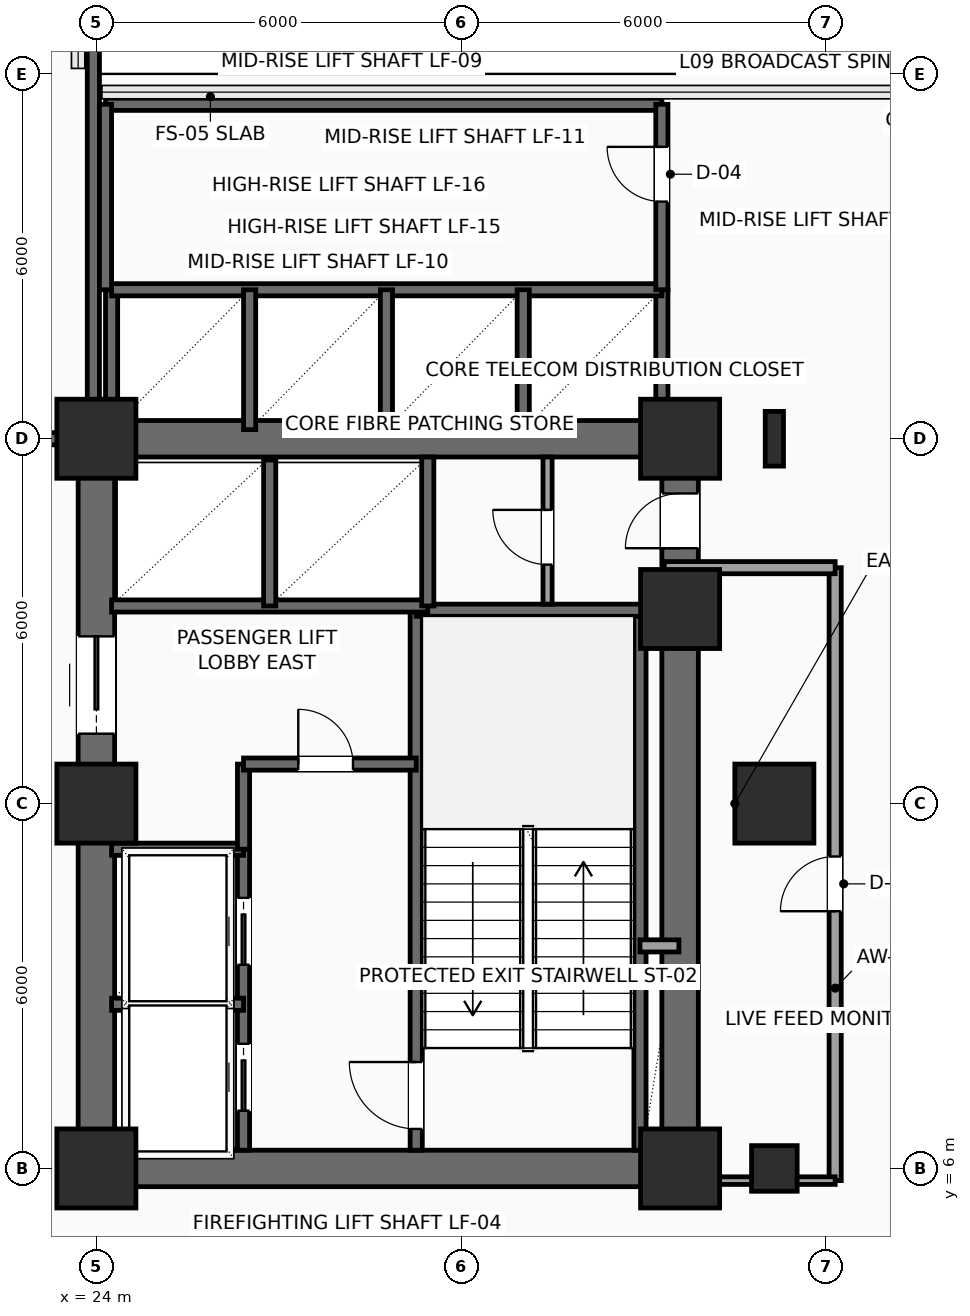
"""IFC4 building model, lengths in metres.
Left out: names, types, materials, properties, quantities, classifications, styles, units other than length and angle.
Written with IfcOpenShell. Run it as: python <this file> out.ifc"""

import sys

from ifc_helpers import new_model, si_unit, direction, frame, frame_2d, origin, origin_2d, place, context, subcontext, project, spatial, rectangle, hollow_rectangle, i_section, extrude, element, fill, save


model = new_model("IFC4")
c1 = context("Model", 3, precision=1e-05, world=origin(), true_north=direction((0.0, 1.0)))
c2 = subcontext(c1, "Body", "Model", "MODEL_VIEW")
j1 = project(units=[si_unit("LENGTHUNIT", "METRE"), si_unit("PLANEANGLEUNIT", "RADIAN")], contexts=[c1])
p1 = place(None, origin())
s1 = spatial("IfcSite", under=j1, at=p1, CompositionType="ELEMENT")
p2 = place(p1, origin())
s2 = spatial("IfcBuilding", under=s1, at=p2, CompositionType="ELEMENT")
p3 = place(p2, frame((0.0, 0.0, 44.1)))
s3 = spatial("IfcBuildingStorey", under=s2, at=p3, CompositionType="ELEMENT", Elevation=44.1)
for number, where, z_axis, x_axis in (
    (1, (24.0, 6.0, 0.0), (0.0, 0.0, 1.0), (1.0, 0.0, 0.0)),
    (2, (24.0, 12.0, 0.0), (0.0, 0.0, 1.0), (1.0, 0.0, 0.0)),
    (3, (24.0, 18.0, 0.0), (0.0, 0.0, 1.0), (1.0, 0.0, 0.0)),
    (4, (33.6, 6.0, 0.0), (0.0, 0.0, 1.0), (1.0, 0.0, 0.0)),
    (5, (33.6, 15.2, 0.0), (0.0, 0.0, 1.0), (1.0, 0.0, 0.0)),
    (6, (33.6, 18.0, 0.0), (0.0, 0.0, 1.0), (1.0, 0.0, 0.0)),
):
    element("IfcColumn", number, at=place(p3, frame(where, z_axis=z_axis, x_axis=x_axis)), inside=s3, PredefinedType="COLUMN", context=c2, shape_type="SweptSolid", body=[
        extrude(rectangle(XDim=1.3, YDim=1.3, at=origin_2d()), origin(), (0.0, 0.0, 1.0), 3.9),
    ])
p4 = place(p3, frame((35.15, 6.0, 0.0), z_axis=(0.0, 0.0, 1.0), x_axis=(1.0, 0.0, 0.0)))
e7 = element("IfcColumn", 7, at=p4, inside=s3, PredefinedType="COLUMN", context=c2, shape_type="SweptSolid", body=[
    extrude(hollow_rectangle(XDim=0.75, YDim=0.75, WallThickness=0.035, InnerFilletRadius=0.035, OuterFilletRadius=0.05, at=origin_2d()), origin(), (0.0, 0.0, 1.0), 3.9),
])
p5 = place(p3, frame((35.15, 12.0, 0.0), z_axis=(0.0, 0.0, 1.0), x_axis=(1.0, 0.0, 0.0)))
e8 = element("IfcColumn", 8, at=p5, inside=s3, PredefinedType="COLUMN", context=c2, shape_type="SweptSolid", body=[
    extrude(rectangle(XDim=1.3, YDim=1.3, at=origin_2d()), origin(), (0.0, 0.0, 1.0), 3.9),
])
p6 = place(p3, frame((35.15, 18.0, 0.0), z_axis=(0.0, 0.0, 1.0), x_axis=(1.0, 0.0, 0.0)))
e9 = element("IfcColumn", 9, at=p6, inside=s3, PredefinedType="COLUMN", context=c2, shape_type="SweptSolid", body=[
    extrude(i_section(OverallWidth=0.3, OverallDepth=0.9, WebThickness=0.019, FlangeThickness=0.035, FilletRadius=0.03, at=origin_2d()), origin(), (0.0, 0.0, 1.0), 3.9),
])
for number, where, z_axis, x_axis in (
    (10, (24.0, 6.0, 0.0), (0.0, 0.0, 1.0), (1.0, 0.0, 0.0)),
    (11, (24.0, 18.0, 0.0), (0.0, 0.0, 1.0), (1.0, 0.0, 0.0)),
):
    element("IfcWall", number, at=place(p3, frame(where, z_axis=z_axis, x_axis=x_axis)), inside=s3, PredefinedType="SHEAR", context=c2, shape_type="SweptSolid", body=[
        extrude(rectangle(XDim=9.6, YDim=0.6, at=frame_2d((4.8, 0.0))), origin(), (0.0, 0.0, 1.0), 3.65),
    ])
p7 = place(p3, frame((24.0, 6.0, 0.0), z_axis=(0.0, 0.0, 1.0), x_axis=(0.0, 1.0, 0.0)))
e12 = element("IfcWall", 12, at=p7, inside=s3, PredefinedType="SHEAR", context=c2, shape_type="SweptSolid", body=[
    extrude(rectangle(XDim=12.0, YDim=0.6, at=frame_2d((6.0, 0.0))), origin(), (0.0, 0.0, 1.0), 3.65),
])
p8 = place(p7, frame((7.15, 0.0, 0.0)))
e13 = element("IfcOpeningElement", 13, at=p8, cuts=e12, PredefinedType="OPENING", context=c2, shape_type="SweptSolid", body=[
    extrude(rectangle(XDim=1.6, YDim=2.3, at=frame_2d((0.8, 1.15))), frame((0.0, 0.31, 0.0), z_axis=(0.0, -1.0, 0.0), x_axis=(1.0, 0.0, 0.0)), (0.0, 0.0, 1.0), 0.62),
])
p9 = place(p3, frame((33.6, 6.0, 0.0), z_axis=(0.0, 0.0, 1.0), x_axis=(0.0, 1.0, 0.0)))
e14 = element("IfcWall", 14, at=p9, inside=s3, PredefinedType="SHEAR", context=c2, shape_type="SweptSolid", body=[
    extrude(rectangle(XDim=12.0, YDim=0.6, at=frame_2d((6.0, 0.0))), origin(), (0.0, 0.0, 1.0), 3.65),
])
p10 = place(p9, frame((10.2, 0.0, 0.0)))
e15 = element("IfcOpeningElement", 15, at=p10, cuts=e14, PredefinedType="OPENING", context=c2, shape_type="SweptSolid", body=[
    extrude(rectangle(XDim=0.9, YDim=2.15, at=frame_2d((0.45, 1.075))), frame((0.0, 0.31, 0.0), z_axis=(0.0, -1.0, 0.0), x_axis=(1.0, 0.0, 0.0)), (0.0, 0.0, 1.0), 0.62),
])
p11 = place(p3, frame((29.26, 6.3, 0.0), z_axis=(0.0, 0.0, 1.0), x_axis=(0.0, 1.0, 0.0)))
e16 = element("IfcWall", 16, at=p11, inside=s3, PredefinedType="SHEAR", context=c2, shape_type="SweptSolid", body=[
    extrude(rectangle(XDim=8.88, YDim=0.2, at=frame_2d((4.44, 0.0))), origin(), (0.0, 0.0, 1.0), 3.65),
])
p12 = place(p11, frame((0.35, 0.0, 0.0)))
e17 = element("IfcOpeningElement", 17, at=p12, cuts=e16, PredefinedType="OPENING", context=c2, shape_type="SweptSolid", body=[
    extrude(rectangle(XDim=1.1, YDim=2.2, at=frame_2d((0.55, 1.1))), frame((0.0, 0.11, 0.0), z_axis=(0.0, -1.0, 0.0), x_axis=(1.0, 0.0, 0.0)), (0.0, 0.0, 1.0), 0.22),
])
p13 = place(p3, frame((32.94, 6.3, 0.0), z_axis=(0.0, 0.0, 1.0), x_axis=(0.0, 1.0, 0.0)))
e18 = element("IfcWall", 18, at=p13, inside=s3, PredefinedType="SHEAR", context=c2, shape_type="SweptSolid", body=[
    extrude(rectangle(XDim=8.88, YDim=0.2, at=frame_2d((4.44, 0.0))), origin(), (0.0, 0.0, 1.0), 3.65),
])
p14 = place(p3, frame((29.26, 15.18, 0.0), z_axis=(0.0, 0.0, 1.0), x_axis=(1.0, 0.0, 0.0)))
e19 = element("IfcWall", 19, at=p14, inside=s3, PredefinedType="SHEAR", context=c2, shape_type="SweptSolid", body=[
    extrude(rectangle(XDim=4.04, YDim=0.2, at=frame_2d((2.02, 0.0))), origin(), (0.0, 0.0, 1.0), 3.65),
])
p15 = place(p3, frame((26.42, 6.3, 0.0), z_axis=(0.0, 0.0, 1.0), x_axis=(0.0, 1.0, 0.0)))
e20 = element("IfcWall", 20, at=p15, inside=s3, PredefinedType="SHEAR", context=c2, shape_type="SweptSolid", body=[
    extrude(rectangle(XDim=4.95, YDim=0.2, at=frame_2d((2.475, 0.0))), origin(), (0.0, 0.0, 1.0), 3.65),
])
p16 = place(p15, frame((0.65, 0.0, 0.0)))
e21 = element("IfcOpeningElement", 21, at=p16, cuts=e20, PredefinedType="OPENING", context=c2, shape_type="SweptSolid", body=[
    extrude(rectangle(XDim=1.1, YDim=2.2, at=frame_2d((0.55, 1.1))), frame((0.0, 0.11, 0.0), z_axis=(0.0, -1.0, 0.0), x_axis=(1.0, 0.0, 0.0)), (0.0, 0.0, 1.0), 0.22),
])
p17 = place(p15, frame((3.05, 0.0, 0.0)))
e22 = element("IfcOpeningElement", 22, at=p17, cuts=e20, PredefinedType="OPENING", context=c2, shape_type="SweptSolid", body=[
    extrude(rectangle(XDim=1.1, YDim=2.2, at=frame_2d((0.55, 1.1))), frame((0.0, 0.11, 0.0), z_axis=(0.0, -1.0, 0.0), x_axis=(1.0, 0.0, 0.0)), (0.0, 0.0, 1.0), 0.22),
])
for number, where, z_axis, x_axis in (
    (23, (24.25, 8.7, 0.0), (0.0, 0.0, 1.0), (1.0, 0.0, 0.0)),
    (24, (24.25, 11.25, 0.0), (0.0, 0.0, 1.0), (1.0, 0.0, 0.0)),
):
    element("IfcWall", number, at=place(p3, frame(where, z_axis=z_axis, x_axis=x_axis)), inside=s3, PredefinedType="SHEAR", context=c2, shape_type="SweptSolid", body=[
        extrude(rectangle(XDim=2.17, YDim=0.2, at=frame_2d((1.085, 0.0))), origin(), (0.0, 0.0, 1.0), 3.65),
    ])
p18 = place(p3, frame((26.42, 11.25, 0.0), z_axis=(0.0, 0.0, 1.0), x_axis=(0.0, 1.0, 0.0)))
e25 = element("IfcWall", 25, at=p18, inside=s3, PredefinedType="SHEAR", context=c2, shape_type="SweptSolid", body=[
    extrude(rectangle(XDim=1.4, YDim=0.2, at=frame_2d((0.7, 0.0))), origin(), (0.0, 0.0, 1.0), 3.65),
])
p19 = place(p3, frame((26.42, 12.65, 0.0), z_axis=(0.0, 0.0, 1.0), x_axis=(1.0, 0.0, 0.0)))
e26 = element("IfcWall", 26, at=p19, inside=s3, PredefinedType="SHEAR", context=c2, shape_type="SweptSolid", body=[
    extrude(rectangle(XDim=2.84, YDim=0.2, at=frame_2d((1.42, 0.0))), origin(), (0.0, 0.0, 1.0), 3.65),
])
p20 = place(p19, frame((0.9, 0.0, 0.0)))
e27 = element("IfcOpeningElement", 27, at=p20, cuts=e26, PredefinedType="OPENING", context=c2, shape_type="SweptSolid", body=[
    extrude(rectangle(XDim=0.9, YDim=2.15, at=frame_2d((0.45, 1.075))), frame((0.0, 0.11, 0.0), z_axis=(0.0, -1.0, 0.0), x_axis=(1.0, 0.0, 0.0)), (0.0, 0.0, 1.0), 0.22),
])
p21 = place(p3, frame((32.94, 9.66, 0.0), z_axis=(0.0, 0.0, 1.0), x_axis=(1.0, 0.0, 0.0)))
e28 = element("IfcWall", 28, at=p21, inside=s3, PredefinedType="SOLIDWALL", context=c2, shape_type="SweptSolid", body=[
    extrude(rectangle(XDim=0.64, YDim=0.2, at=frame_2d((0.32, 0.0))), origin(), (0.0, 0.0, 1.0), 3.65),
])
p22 = place(p3, frame((24.25, 15.25, 0.0), z_axis=(0.0, 0.0, 1.0), x_axis=(1.0, 0.0, 0.0)))
e29 = element("IfcWall", 29, at=p22, inside=s3, PredefinedType="SHEAR", context=c2, shape_type="SweptSolid", body=[
    extrude(rectangle(XDim=5.2, YDim=0.2, at=frame_2d((2.6, 0.0))), origin(), (0.0, 0.0, 1.0), 3.65),
])
p23 = place(p3, frame((26.85, 15.25, 0.0), z_axis=(0.0, 0.0, 1.0), x_axis=(0.0, 1.0, 0.0)))
e30 = element("IfcWall", 30, at=p23, inside=s3, PredefinedType="SHEAR", context=c2, shape_type="SweptSolid", body=[
    extrude(rectangle(XDim=2.4, YDim=0.2, at=frame_2d((1.2, 0.0))), origin(), (0.0, 0.0, 1.0), 3.65),
])
p24 = place(p3, frame((29.45, 15.25, 0.0), z_axis=(0.0, 0.0, 1.0), x_axis=(0.0, 1.0, 0.0)))
e31 = element("IfcWall", 31, at=p24, inside=s3, PredefinedType="SHEAR", context=c2, shape_type="SweptSolid", body=[
    extrude(rectangle(XDim=2.45, YDim=0.2, at=frame_2d((1.225, 0.0))), origin(), (0.0, 0.0, 1.0), 3.65),
])
p25 = place(p3, frame((31.42, 15.28, 0.0), z_axis=(0.0, 0.0, 1.0), x_axis=(0.0, 1.0, 0.0)))
e32 = element("IfcWall", 32, at=p25, inside=s3, PredefinedType="PARTITIONING", context=c2, shape_type="SweptSolid", body=[
    extrude(rectangle(XDim=2.42, YDim=0.15, at=frame_2d((1.21, 0.0))), origin(), (0.0, 0.0, 1.0), 3.65),
])
p26 = place(p25, frame((0.65, 0.0, 0.0)))
e33 = element("IfcOpeningElement", 33, at=p26, cuts=e32, PredefinedType="OPENING", context=c2, shape_type="SweptSolid", body=[
    extrude(rectangle(XDim=0.9, YDim=2.15, at=frame_2d((0.45, 1.075))), frame((0.0, 0.085, 0.0), z_axis=(0.0, -1.0, 0.0), x_axis=(1.0, 0.0, 0.0)), (0.0, 0.0, 1.0), 0.17),
])
p27 = place(p3, frame((20.45, 18.0, 0.0), z_axis=(0.0, 0.0, 1.0), x_axis=(1.0, 0.0, 0.0)))
e34 = element("IfcWall", 34, at=p27, inside=s3, PredefinedType="SHEAR", context=c2, shape_type="SweptSolid", body=[
    extrude(rectangle(XDim=3.5, YDim=0.2, at=frame_2d((1.75, 0.0))), origin(), (0.0, 0.0, 1.0), 3.65),
])
p28 = place(p27, frame((0.95, 0.0, 0.0)))
e35 = element("IfcOpeningElement", 35, at=p28, cuts=e34, PredefinedType="OPENING", context=c2, shape_type="SweptSolid", body=[
    extrude(rectangle(XDim=1.6, YDim=2.3, at=frame_2d((0.8, 1.15))), frame((0.0, 0.11, 0.0), z_axis=(0.0, -1.0, 0.0), x_axis=(1.0, 0.0, 0.0)), (0.0, 0.0, 1.0), 0.22),
])
p29 = place(p3, frame((23.95, 18.0, 0.0), z_axis=(0.0, 0.0, 1.0), x_axis=(0.0, 1.0, 0.0)))
e36 = element("IfcWall", 36, at=p29, inside=s3, PredefinedType="SHEAR", context=c2, shape_type="SweptSolid", body=[
    extrude(rectangle(XDim=9.3, YDim=0.2, at=frame_2d((4.65, 0.0))), origin(), (0.0, 0.0, 1.0), 3.65),
])
for number, where, z_axis, x_axis in (
    (37, (33.3, 18.1, 0.0), (0.0, 0.0, 1.0), (0.0, 1.0, 0.0)),
    (38, (24.25, 18.1, 0.0), (0.0, 0.0, 1.0), (0.0, 1.0, 0.0)),
):
    element("IfcWall", number, at=place(p3, frame(where, z_axis=z_axis, x_axis=x_axis)), inside=s3, PredefinedType="SHEAR", context=c2, shape_type="SweptSolid", body=[
        extrude(rectangle(XDim=2.35, YDim=0.2, at=frame_2d((1.175, 0.0))), origin(), (0.0, 0.0, 1.0), 3.65),
    ])
p30 = place(p3, frame((24.25, 20.45, 0.0), z_axis=(0.0, 0.0, 1.0), x_axis=(1.0, 0.0, 0.0)))
e39 = element("IfcWall", 39, at=p30, inside=s3, PredefinedType="SHEAR", context=c2, shape_type="SweptSolid", body=[
    extrude(rectangle(XDim=9.05, YDim=0.2, at=frame_2d((4.525, 0.0))), origin(), (0.0, 0.0, 1.0), 3.65),
])
for number, where, z_axis, x_axis in (
    (40, (26.52, 18.15, 0.0), (0.0, 0.0, 1.0), (0.0, 1.0, 0.0)),
    (41, (28.77, 18.15, 0.0), (0.0, 0.0, 1.0), (0.0, 1.0, 0.0)),
    (42, (31.02, 18.15, 0.0), (0.0, 0.0, 1.0), (0.0, 1.0, 0.0)),
):
    element("IfcWall", number, at=place(p3, frame(where, z_axis=z_axis, x_axis=x_axis)), inside=s3, PredefinedType="SHEAR", context=c2, shape_type="SweptSolid", body=[
        extrude(rectangle(XDim=2.3, YDim=0.2, at=frame_2d((1.15, 0.0))), origin(), (0.0, 0.0, 1.0), 3.65),
    ])
p31 = place(p3, frame((24.15, 23.5, 0.0), z_axis=(0.0, 0.0, 1.0), x_axis=(1.0, 0.0, 0.0)))
e43 = element("IfcWall", 43, at=p31, inside=s3, PredefinedType="SHEAR", context=c2, shape_type="SweptSolid", body=[
    extrude(rectangle(XDim=9.15, YDim=0.2, at=frame_2d((4.575, 0.0))), origin(), (0.0, 0.0, 1.0), 3.65),
])
p32 = place(p3, frame((33.3, 20.45, 0.0), z_axis=(0.0, 0.0, 1.0), x_axis=(0.0, 1.0, 0.0)))
e44 = element("IfcWall", 44, at=p32, inside=s3, PredefinedType="SHEAR", context=c2, shape_type="SweptSolid", body=[
    extrude(rectangle(XDim=3.05, YDim=0.2, at=frame_2d((1.525, 0.0))), origin(), (0.0, 0.0, 1.0), 3.65),
])
p33 = place(p32, frame((1.45, 0.0, 0.0)))
e45 = element("IfcOpeningElement", 45, at=p33, cuts=e44, PredefinedType="OPENING", context=c2, shape_type="SweptSolid", body=[
    extrude(rectangle(XDim=0.9, YDim=2.15, at=frame_2d((0.45, 1.075))), frame((0.0, 0.11, 0.0), z_axis=(0.0, -1.0, 0.0), x_axis=(1.0, 0.0, 0.0)), (0.0, 0.0, 1.0), 0.22),
])
p34 = place(p3, frame((24.15, 20.45, 0.0), z_axis=(0.0, 0.0, 1.0), x_axis=(0.0, 1.0, 0.0)))
e46 = element("IfcWall", 46, at=p34, inside=s3, PredefinedType="SHEAR", context=c2, shape_type="SweptSolid", body=[
    extrude(rectangle(XDim=3.05, YDim=0.2, at=frame_2d((1.525, 0.0))), origin(), (0.0, 0.0, 1.0), 3.65),
])
p35 = place(p3, frame((36.15, 5.8, 0.0), z_axis=(0.0, 0.0, 1.0), x_axis=(0.0, 1.0, 0.0)))
e47 = element("IfcWall", 47, at=p35, inside=s3, PredefinedType="PARTITIONING", context=c2, shape_type="SweptSolid", body=[
    extrude(rectangle(XDim=10.08, YDim=0.2, at=frame_2d((5.04, 0.0))), origin(), (0.0, 0.0, 1.0), 3.65),
])
p36 = place(p35, frame((4.43, 0.0, 0.0)))
e48 = element("IfcOpeningElement", 48, at=p36, cuts=e47, PredefinedType="OPENING", context=c2, shape_type="SweptSolid", body=[
    extrude(rectangle(XDim=0.9, YDim=2.1, at=frame_2d((0.45, 1.05))), frame((0.0, 0.11, 0.0), z_axis=(0.0, -1.0, 0.0), x_axis=(1.0, 0.0, 0.0)), (0.0, 0.0, 1.0), 0.22),
])
p37 = place(p3, frame((36.15, 15.88, 0.0), z_axis=(0.0, 0.0, 1.0), x_axis=(-1.0, 0.0, 0.0)))
e49 = element("IfcWall", 49, at=p37, inside=s3, PredefinedType="PARTITIONING", context=c2, shape_type="SweptSolid", body=[
    extrude(rectangle(XDim=2.81, YDim=0.2, at=frame_2d((1.405, 0.0))), origin(), (0.0, 0.0, 1.0), 3.65),
])
p38 = place(p3, frame((33.65, 5.8, 0.0), z_axis=(0.0, 0.0, 1.0), x_axis=(1.0, 0.0, 0.0)))
e50 = element("IfcWall", 50, at=p38, inside=s3, PredefinedType="PARTITIONING", context=c2, shape_type="SweptSolid", body=[
    extrude(rectangle(XDim=2.5, YDim=0.125, at=frame_2d((1.25, 0.0))), origin(), (0.0, 0.0, 1.0), 2.992),
])
p39 = place(p8, origin())
e51 = element("IfcDoor", 51, at=p39, inside=s3, OperationType="DOUBLE_DOOR_SLIDING", PredefinedType="DOOR", context=c2, shape_type="SweptSolid", body=[
    extrude(rectangle(XDim=1.6, YDim=2.3, at=frame_2d((0.8, 1.15))), frame((0.0, 0.025, 0.0), z_axis=(0.0, -1.0, 0.0), x_axis=(1.0, 0.0, 0.0)), (0.0, 0.0, 1.0), 0.05),
])
fill(e13, e51)
p40 = place(p10, origin())
e52 = element("IfcDoor", 52, at=p40, inside=s3, OperationType="SINGLE_SWING_LEFT", PredefinedType="DOOR", context=c2, shape_type="SweptSolid", body=[
    extrude(rectangle(XDim=0.9, YDim=2.15, at=frame_2d((0.45, 1.075))), frame((0.0, 0.025, 0.0), z_axis=(0.0, -1.0, 0.0), x_axis=(1.0, 0.0, 0.0)), (0.0, 0.0, 1.0), 0.05),
])
fill(e15, e52)
p41 = place(p12, origin())
e53 = element("IfcDoor", 53, at=p41, inside=s3, OperationType="SINGLE_SWING_RIGHT", PredefinedType="DOOR", context=c2, shape_type="SweptSolid", body=[
    extrude(rectangle(XDim=1.1, YDim=2.2, at=frame_2d((0.55, 1.1))), frame((0.0, 0.025, 0.0), z_axis=(0.0, -1.0, 0.0), x_axis=(1.0, 0.0, 0.0)), (0.0, 0.0, 1.0), 0.05),
])
fill(e17, e53)
p42 = place(p16, origin())
e54 = element("IfcDoor", 54, at=p42, inside=s3, OperationType="SLIDING_TO_LEFT", PredefinedType="DOOR", context=c2, shape_type="SweptSolid", body=[
    extrude(rectangle(XDim=1.1, YDim=2.2, at=frame_2d((0.55, 1.1))), frame((0.0, 0.025, 0.0), z_axis=(0.0, -1.0, 0.0), x_axis=(1.0, 0.0, 0.0)), (0.0, 0.0, 1.0), 0.05),
])
fill(e21, e54)
p43 = place(p17, origin())
e55 = element("IfcDoor", 55, at=p43, inside=s3, OperationType="SLIDING_TO_LEFT", PredefinedType="DOOR", context=c2, shape_type="SweptSolid", body=[
    extrude(rectangle(XDim=1.1, YDim=2.2, at=frame_2d((0.55, 1.1))), frame((0.0, 0.025, 0.0), z_axis=(0.0, -1.0, 0.0), x_axis=(1.0, 0.0, 0.0)), (0.0, 0.0, 1.0), 0.05),
])
fill(e22, e55)
p44 = place(p20, origin())
e56 = element("IfcDoor", 56, at=p44, inside=s3, OperationType="SINGLE_SWING_LEFT", PredefinedType="DOOR", context=c2, shape_type="SweptSolid", body=[
    extrude(rectangle(XDim=0.9, YDim=2.15, at=frame_2d((0.45, 1.075))), frame((0.0, 0.025, 0.0), z_axis=(0.0, -1.0, 0.0), x_axis=(1.0, 0.0, 0.0)), (0.0, 0.0, 1.0), 0.05),
])
fill(e27, e56)
p45 = place(p26, origin())
e57 = element("IfcDoor", 57, at=p45, inside=s3, OperationType="SINGLE_SWING_RIGHT", PredefinedType="DOOR", context=c2, shape_type="SweptSolid", body=[
    extrude(rectangle(XDim=0.9, YDim=2.15, at=frame_2d((0.45, 1.075))), frame((0.0, 0.025, 0.0), z_axis=(0.0, -1.0, 0.0), x_axis=(1.0, 0.0, 0.0)), (0.0, 0.0, 1.0), 0.05),
])
fill(e33, e57)
p46 = place(p33, origin())
e58 = element("IfcDoor", 58, at=p46, inside=s3, OperationType="SINGLE_SWING_RIGHT", PredefinedType="DOOR", context=c2, shape_type="SweptSolid", body=[
    extrude(rectangle(XDim=0.9, YDim=2.15, at=frame_2d((0.45, 1.075))), frame((0.0, 0.025, 0.0), z_axis=(0.0, -1.0, 0.0), x_axis=(1.0, 0.0, 0.0)), (0.0, 0.0, 1.0), 0.05),
])
fill(e45, e58)
p47 = place(p36, origin())
e59 = element("IfcDoor", 59, at=p47, inside=s3, OperationType="SINGLE_SWING_LEFT", PredefinedType="DOOR", context=c2, shape_type="SweptSolid", body=[
    extrude(rectangle(XDim=0.9, YDim=2.1, at=frame_2d((0.45, 1.05))), frame((0.0, 0.025, 0.0), z_axis=(0.0, -1.0, 0.0), x_axis=(1.0, 0.0, 0.0)), (0.0, 0.0, 1.0), 0.05),
])
fill(e48, e59)
save(model, sys.argv[1])
